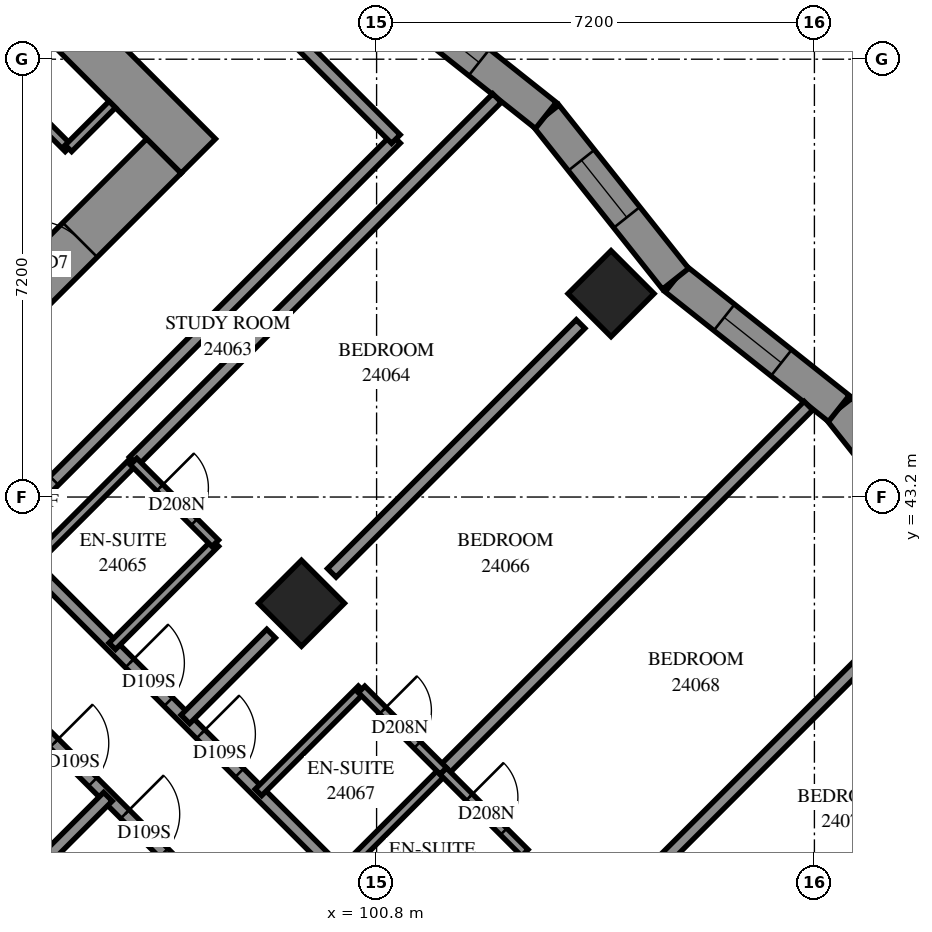
"""IFC4 building model, lengths in metres.
Left out: names, types, materials, properties, quantities, classifications, styles, units other than length and angle.
Written with IfcOpenShell. Run it as: python <this file> out.ifc"""

import sys

from ifc_helpers import new_model, si_unit, direction, frame, frame_2d, origin, origin_2d, place, context, subcontext, project, spatial, polyline, rectangle, outline, extrude, element, fill, save


model = new_model("IFC4")
c1 = context("Model", 3, precision=1e-05, world=origin(), true_north=direction((0.0, 1.0)))
c2 = subcontext(c1, "Body", "Model", "MODEL_VIEW")
j1 = project(units=[si_unit("LENGTHUNIT", "METRE"), si_unit("PLANEANGLEUNIT", "RADIAN")], contexts=[c1])
p1 = place(None, origin())
s1 = spatial("IfcSite", under=j1, at=p1, CompositionType="ELEMENT")
p2 = place(p1, origin())
s2 = spatial("IfcBuilding", under=s1, at=p2, CompositionType="ELEMENT")
p3 = place(p2, frame((0.0, 0.0, 91.4)))
s3 = spatial("IfcBuildingStorey", under=s2, at=p3, CompositionType="ELEMENT", Elevation=91.4)
for number, where, z_axis, x_axis in (
    (1, (104.656, 46.544, 0.0), (0.0, 0.0, 1.0), (0.707, -0.707, 0.0)),
    (2, (99.565, 41.453, 0.0), (0.0, 0.0, 1.0), (0.707, -0.707, 0.0)),
):
    element("IfcColumn", number, at=place(p3, frame(where, z_axis=z_axis, x_axis=x_axis)), inside=s3, PredefinedType="COLUMN", context=c2, shape_type="SweptSolid", body=[
        extrude(rectangle(XDim=1.0, YDim=1.0, at=origin_2d()), origin(), (0.0, 0.0, 1.0), 3.1),
    ])
p4 = place(p3, frame((86.554, 60.121, -0.3), z_axis=(0.0, 0.0, 1.0), x_axis=(0.7071067812, -0.7071067812, 0.0)))
e3 = element("IfcWall", 3, at=p4, inside=s3, PredefinedType="SHEAR", context=c2, shape_type="SweptSolid", body=[
    extrude(rectangle(XDim=16.0, YDim=0.8, at=frame_2d((8.0, 0.0))), origin(), (0.0, 0.0, 1.0), 2.7),
])
p5 = place(p4, frame((10.8, 0.0, 0.3)))
e4 = element("IfcOpeningElement", 4, at=p5, cuts=e3, PredefinedType="OPENING", context=c2, shape_type="SweptSolid", body=[
    extrude(rectangle(XDim=0.8, YDim=2.1, at=frame_2d((0.4, 1.05))), frame((0.0, 0.41, 0.0), z_axis=(0.0, -1.0, 0.0), x_axis=(1.0, 0.0, 0.0)), (0.0, 0.0, 1.0), 0.82),
])
p6 = place(p3, frame((87.12, 38.625, -0.3), z_axis=(0.0, 0.0, 1.0), x_axis=(0.7071067812, 0.7071067812, 0.0)))
e5 = element("IfcWall", 5, at=p6, inside=s3, PredefinedType="SHEAR", context=c2, shape_type="SweptSolid", body=[
    extrude(rectangle(XDim=14.4, YDim=0.8, at=frame_2d((7.2, 0.0))), origin(), (0.0, 0.0, 1.0), 2.7),
])
p7 = place(p6, frame((4.55, 0.0, 0.3)))
e6 = element("IfcOpeningElement", 6, at=p7, cuts=e5, PredefinedType="OPENING", context=c2, shape_type="SweptSolid", body=[
    extrude(rectangle(XDim=1.1, YDim=2.1, at=frame_2d((0.55, 1.05))), frame((0.0, 0.41, 0.0), z_axis=(0.0, -1.0, 0.0), x_axis=(1.0, 0.0, 0.0)), (0.0, 0.0, 1.0), 0.82),
])
p8 = place(p6, frame((11.35, 0.0, 0.3)))
e7 = element("IfcOpeningElement", 7, at=p8, cuts=e5, PredefinedType="OPENING", context=c2, shape_type="SweptSolid", body=[
    extrude(rectangle(XDim=1.1, YDim=2.1, at=frame_2d((0.55, 1.05))), frame((0.0, 0.41, 0.0), z_axis=(0.0, -1.0, 0.0), x_axis=(1.0, 0.0, 0.0)), (0.0, 0.0, 1.0), 0.82),
])
p9 = place(p3, frame((110.551, 41.951, 0.0), z_axis=(0.0, 0.0, 1.0), x_axis=(-0.6218910216, 0.7831037972, 0.0)))
e8 = element("IfcWall", 8, at=p9, inside=s3, PredefinedType="SOLIDWALL", context=c2, shape_type="SweptSolid", body=[
    extrude(outline(polyline([(0.055, -0.275), (3.485, -0.275), (3.422, 0.275), (-0.055, 0.275), (0.055, -0.275)])), origin(), (0.0, 0.0, 1.0), 3.1),
])
p10 = place(p9, frame((1.111, 0.0, 0.5)))
e9 = element("IfcOpeningElement", 9, at=p10, cuts=e8, PredefinedType="OPENING", context=c2, shape_type="SweptSolid", body=[
    extrude(rectangle(XDim=1.2, YDim=2.45, at=frame_2d((0.6, 1.225))), frame((0.0, 0.285, 0.0), z_axis=(0.0, -1.0, 0.0), x_axis=(1.0, 0.0, 0.0)), (0.0, 0.0, 1.0), 0.57),
])
p11 = place(p3, frame((108.403, 44.656, 0.0), z_axis=(0.0, 0.0, 1.0), x_axis=(-0.7830937263, 0.6219037031, 0.0)))
e10 = element("IfcWall", 10, at=p11, inside=s3, PredefinedType="SOLIDWALL", context=c2, shape_type="SweptSolid", body=[
    extrude(outline(polyline([(-0.032, -0.275), (3.398, -0.275), (3.462, 0.275), (0.032, 0.275), (-0.032, -0.275)])), origin(), (0.0, 0.0, 1.0), 3.1),
])
p12 = place(p11, frame((1.209, 0.0, 0.5)))
e11 = element("IfcOpeningElement", 11, at=p12, cuts=e10, PredefinedType="OPENING", context=c2, shape_type="SweptSolid", body=[
    extrude(rectangle(XDim=1.2, YDim=2.45, at=frame_2d((0.6, 1.225))), frame((0.0, 0.285, 0.0), z_axis=(0.0, -1.0, 0.0), x_axis=(1.0, 0.0, 0.0)), (0.0, 0.0, 1.0), 0.57),
])
p13 = place(p3, frame((105.717, 46.789, 0.0), z_axis=(0.0, 0.0, 1.0), x_axis=(-0.621900023, 0.7830966489, 0.0)))
e12 = element("IfcWall", 12, at=p13, inside=s3, PredefinedType="SOLIDWALL", context=c2, shape_type="SweptSolid", body=[
    extrude(outline(polyline([(0.032, -0.275), (3.462, -0.275), (3.398, 0.275), (-0.032, 0.275), (0.032, -0.275)])), origin(), (0.0, 0.0, 1.0), 3.1),
])
p14 = place(p13, frame((1.29, 0.0, 0.5)))
e13 = element("IfcOpeningElement", 13, at=p14, cuts=e12, PredefinedType="OPENING", context=c2, shape_type="SweptSolid", body=[
    extrude(rectangle(XDim=1.2, YDim=2.45, at=frame_2d((0.6, 1.225))), frame((0.0, 0.285, 0.0), z_axis=(0.0, -1.0, 0.0), x_axis=(1.0, 0.0, 0.0)), (0.0, 0.0, 1.0), 0.57),
])
p15 = place(p3, frame((103.584, 49.475, 0.0), z_axis=(0.0, 0.0, 1.0), x_axis=(-0.7830937263, 0.6219037031, 0.0)))
e14 = element("IfcWall", 14, at=p15, inside=s3, PredefinedType="SOLIDWALL", context=c2, shape_type="SweptSolid", body=[
    extrude(outline(polyline([(-0.032, -0.275), (3.398, -0.275), (3.462, 0.275), (0.032, 0.275), (-0.032, -0.275)])), origin(), (0.0, 0.0, 1.0), 3.1),
])
p16 = place(p15, frame((1.402, 0.0, 0.5)))
e15 = element("IfcOpeningElement", 15, at=p16, cuts=e14, PredefinedType="OPENING", context=c2, shape_type="SweptSolid", body=[
    extrude(rectangle(XDim=1.2, YDim=2.45, at=frame_2d((0.6, 1.225))), frame((0.0, 0.285, 0.0), z_axis=(0.0, -1.0, 0.0), x_axis=(1.0, 0.0, 0.0)), (0.0, 0.0, 1.0), 0.57),
])
p17 = place(p3, frame((91.313, 53.354, 0.0), z_axis=(0.0, 0.0, 1.0), x_axis=(0.7071147811, -0.7070987812, 0.0)))
e16 = element("IfcWall", 16, at=p17, inside=s3, PredefinedType="PARTITIONING", context=c2, shape_type="SweptSolid", body=[
    extrude(rectangle(XDim=6.25, YDim=0.15, at=frame_2d((3.125, 0.0))), origin(), (0.0, 0.0, 1.0), 3.1),
])
p18 = place(p3, frame((95.732, 48.934, 0.0), z_axis=(0.0, 0.0, 1.0), x_axis=(0.7071067812, 0.7071067812, 0.0)))
e17 = element("IfcWall", 17, at=p18, inside=s3, PredefinedType="PARTITIONING", context=c2, shape_type="SweptSolid", body=[
    extrude(rectangle(XDim=1.02, YDim=0.15, at=frame_2d((0.51, 0.0))), origin(), (0.0, 0.0, 1.0), 3.1),
])
p19 = place(p3, frame((93.339, 41.309, 0.0), z_axis=(0.0, 0.0, 1.0), x_axis=(0.7071067812, -0.7071067812, 0.0)))
e18 = element("IfcWall", 18, at=p19, inside=s3, PredefinedType="PARTITIONING", context=c2, shape_type="SweptSolid", body=[
    extrude(rectangle(XDim=18.702, YDim=0.2, at=frame_2d((9.351, 0.0))), origin(), (0.0, 0.0, 1.0), 3.1),
])
p20 = place(p19, frame((3.05, 0.0, 0.0)))
e19 = element("IfcOpeningElement", 19, at=p20, cuts=e18, PredefinedType="OPENING", context=c2, shape_type="SweptSolid", body=[
    extrude(rectangle(XDim=0.9, YDim=2.1, at=frame_2d((0.45, 1.05))), frame((0.0, 0.11, 0.0), z_axis=(0.0, -1.0, 0.0), x_axis=(1.0, 0.0, 0.0)), (0.0, 0.0, 1.0), 0.22),
])
p21 = place(p19, frame((4.7, 0.0, 0.0)))
e20 = element("IfcOpeningElement", 20, at=p21, cuts=e18, PredefinedType="OPENING", context=c2, shape_type="SweptSolid", body=[
    extrude(rectangle(XDim=0.9, YDim=2.1, at=frame_2d((0.45, 1.05))), frame((0.0, 0.11, 0.0), z_axis=(0.0, -1.0, 0.0), x_axis=(1.0, 0.0, 0.0)), (0.0, 0.0, 1.0), 0.22),
])
p22 = place(p19, frame((10.149, 0.0, 0.0)))
e21 = element("IfcOpeningElement", 21, at=p22, cuts=e18, PredefinedType="OPENING", context=c2, shape_type="SweptSolid", body=[
    extrude(rectangle(XDim=0.9, YDim=2.1, at=frame_2d((0.45, 1.05))), frame((0.0, 0.11, 0.0), z_axis=(0.0, -1.0, 0.0), x_axis=(1.0, 0.0, 0.0)), (0.0, 0.0, 1.0), 0.22),
])
p23 = place(p19, frame((11.9, 0.0, 0.0)))
e22 = element("IfcOpeningElement", 22, at=p23, cuts=e18, PredefinedType="OPENING", context=c2, shape_type="SweptSolid", body=[
    extrude(rectangle(XDim=0.9, YDim=2.1, at=frame_2d((0.45, 1.05))), frame((0.0, 0.11, 0.0), z_axis=(0.0, -1.0, 0.0), x_axis=(1.0, 0.0, 0.0)), (0.0, 0.0, 1.0), 0.22),
])
p24 = place(p19, frame((17.45, 0.0, 0.0)))
e23 = element("IfcOpeningElement", 23, at=p24, cuts=e18, PredefinedType="OPENING", context=c2, shape_type="SweptSolid", body=[
    extrude(rectangle(XDim=0.9, YDim=2.1, at=frame_2d((0.45, 1.05))), frame((0.0, 0.11, 0.0), z_axis=(0.0, -1.0, 0.0), x_axis=(1.0, 0.0, 0.0)), (0.0, 0.0, 1.0), 0.22),
])
p25 = place(p3, frame((94.615, 42.587, 0.0), z_axis=(0.0, 0.0, 1.0), x_axis=(0.7071067812, 0.7071067812, 0.0)))
e24 = element("IfcWall", 24, at=p25, inside=s3, PredefinedType="PARTITIONING", context=c2, shape_type="SweptSolid", body=[
    extrude(rectangle(XDim=9.198, YDim=0.2, at=frame_2d((4.599, 0.0))), origin(), (0.0, 0.0, 1.0), 3.1),
])
p26 = place(p25, frame((0.248, 0.0, 0.0)))
e25 = element("IfcOpeningElement", 25, at=p26, cuts=e24, PredefinedType="OPENING", context=c2, shape_type="SweptSolid", body=[
    extrude(rectangle(XDim=1.0, YDim=2.1, at=frame_2d((0.5, 1.05))), frame((0.0, 0.11, 0.0), z_axis=(0.0, -1.0, 0.0), x_axis=(1.0, 0.0, 0.0)), (0.0, 0.0, 1.0), 0.22),
])
p27 = place(p3, frame((101.896, 38.698, 0.0), z_axis=(0.0, 0.0, 1.0), x_axis=(0.7072304079, 0.7069831328, 0.0)))
e26 = element("IfcWall", 26, at=p27, inside=s3, PredefinedType="PARTITIONING", context=c2, shape_type="SweptSolid", body=[
    extrude(rectangle(XDim=8.493, YDim=0.2, at=frame_2d((4.246, 0.0))), origin(), (0.0, 0.0, 1.0), 3.1),
])
p28 = place(p3, frame((96.805, 43.787, 0.0), z_axis=(0.0, 0.0, 1.0), x_axis=(0.7071126983, 0.707100864, 0.0)))
e27 = element("IfcWall", 27, at=p28, inside=s3, PredefinedType="PARTITIONING", context=c2, shape_type="SweptSolid", body=[
    extrude(rectangle(XDim=8.45, YDim=0.2, at=frame_2d((4.225, 0.0))), origin(), (0.0, 0.0, 1.0), 3.1),
])
p29 = place(p3, frame((94.62, 42.587, 0.0), z_axis=(0.0, 0.0, 1.0), x_axis=(0.7071067812, -0.7071067812, 0.0)))
e28 = element("IfcWall", 28, at=p29, inside=s3, PredefinedType="PARTITIONING", context=c2, shape_type="SweptSolid", body=[
    extrude(rectangle(XDim=7.9, YDim=0.2, at=frame_2d((3.95, 0.0))), origin(), (0.0, 0.0, 1.0), 3.1),
])
p30 = place(p29, frame((2.998, 0.0, 0.0)))
e29 = element("IfcOpeningElement", 29, at=p30, cuts=e28, PredefinedType="OPENING", context=c2, shape_type="SweptSolid", body=[
    extrude(rectangle(XDim=0.9, YDim=2.1, at=frame_2d((0.45, 1.05))), frame((0.0, 0.11, 0.0), z_axis=(0.0, -1.0, 0.0), x_axis=(1.0, 0.0, 0.0)), (0.0, 0.0, 1.0), 0.22),
])
p31 = place(p29, frame((4.649, 0.0, 0.0)))
e30 = element("IfcOpeningElement", 30, at=p31, cuts=e28, PredefinedType="OPENING", context=c2, shape_type="SweptSolid", body=[
    extrude(rectangle(XDim=0.9, YDim=2.1, at=frame_2d((0.45, 1.05))), frame((0.0, 0.11, 0.0), z_axis=(0.0, -1.0, 0.0), x_axis=(1.0, 0.0, 0.0)), (0.0, 0.0, 1.0), 0.22),
])
for number, where, z_axis, x_axis in (
    (31, (105.155, 36.863, 0.0), (0.0, 0.0, 1.0), (0.707, 0.707, 0.0)),
    (32, (100.063, 41.953, 0.0), (0.0, 0.0, 1.0), (0.707, 0.707, 0.0)),
):
    element("IfcWall", number, at=place(p3, frame(where, z_axis=z_axis, x_axis=x_axis)), inside=s3, PredefinedType="PARTITIONING", context=c2, shape_type="SweptSolid", body=[
        extrude(rectangle(XDim=5.787, YDim=0.2, at=frame_2d((2.893, 0.0))), origin(), (0.0, 0.0, 1.0), 3.1),
    ])
p32 = place(p3, frame((99.071, 51.133, 0.0), z_axis=(0.0, 0.0, 1.0), x_axis=(0.7071067812, -0.7071067812, 0.0)))
e33 = element("IfcWall", 33, at=p32, inside=s3, PredefinedType="PARTITIONING", context=c2, shape_type="SweptSolid", body=[
    extrude(rectangle(XDim=2.893, YDim=0.2, at=frame_2d((1.447, 0.0))), origin(), (0.0, 0.0, 1.0), 3.1),
])
p33 = place(p3, frame((100.203, 36.997, 0.0), z_axis=(0.0, 0.0, 1.0), x_axis=(0.706689978, 0.7075233388, 0.0)))
e34 = element("IfcWall", 34, at=p33, inside=s3, PredefinedType="PARTITIONING", context=c2, shape_type="SweptSolid", body=[
    extrude(rectangle(XDim=2.4, YDim=0.15, at=frame_2d((1.2, 0.0))), origin(), (0.0, 0.0, 1.0), 3.1),
])
for number, where, z_axis, x_axis in (
    (35, (96.453, 40.747, 0.0), (0.0, 0.0, 1.0), (0.707, 0.707, 0.0)),
    (36, (95.109, 42.091, 0.0), (0.0, 0.0, 1.0), (0.707, 0.707, 0.0)),
    (37, (98.857, 38.343, 0.0), (0.0, 0.0, 1.0), (0.707, 0.707, 0.0)),
    (38, (101.545, 35.657, 0.0), (0.0, 0.0, 1.0), (0.707, 0.707, 0.0)),
):
    element("IfcWall", number, at=place(p3, frame(where, z_axis=z_axis, x_axis=x_axis)), inside=s3, PredefinedType="PARTITIONING", context=c2, shape_type="SweptSolid", body=[
        extrude(rectangle(XDim=2.398, YDim=0.15, at=frame_2d((1.199, 0.0))), origin(), (0.0, 0.0, 1.0), 3.1),
    ])
for number, where, z_axis, x_axis in (
    (39, (97.655, 39.545, 0.0), (0.0, 0.0, 1.0), (0.707, 0.707, 0.0)),
    (40, (94.972, 36.862, 0.0), (0.0, 0.0, 1.0), (0.707, 0.707, 0.0)),
):
    element("IfcWall", number, at=place(p3, frame(where, z_axis=z_axis, x_axis=x_axis)), inside=s3, PredefinedType="PARTITIONING", context=c2, shape_type="SweptSolid", body=[
        extrude(rectangle(XDim=1.994, YDim=0.2, at=frame_2d((0.997, 0.0))), origin(), (0.0, 0.0, 1.0), 3.1),
    ])
p34 = place(p3, frame((96.803, 43.783, 0.0), z_axis=(0.0, 0.0, 1.0), x_axis=(0.7071067812, -0.7071067812, 0.0)))
e41 = element("IfcWall", 41, at=p34, inside=s3, PredefinedType="PARTITIONING", context=c2, shape_type="SweptSolid", body=[
    extrude(rectangle(XDim=1.901, YDim=0.15, at=frame_2d((0.95, 0.0))), origin(), (0.0, 0.0, 1.0), 3.1),
])
p35 = place(p34, frame((0.609, 0.0, 0.0)))
e42 = element("IfcOpeningElement", 42, at=p35, cuts=e41, PredefinedType="OPENING", context=c2, shape_type="SweptSolid", body=[
    extrude(rectangle(XDim=0.8, YDim=2.1, at=frame_2d((0.4, 1.05))), frame((0.0, 0.085, 0.0), z_axis=(0.0, -1.0, 0.0), x_axis=(1.0, 0.0, 0.0)), (0.0, 0.0, 1.0), 0.17),
])
p36 = place(p3, frame((101.894, 38.693, 0.0), z_axis=(0.0, 0.0, 1.0), x_axis=(0.7071067812, -0.7071067812, 0.0)))
e43 = element("IfcWall", 43, at=p36, inside=s3, PredefinedType="PARTITIONING", context=c2, shape_type="SweptSolid", body=[
    extrude(rectangle(XDim=1.901, YDim=0.15, at=frame_2d((0.95, 0.0))), origin(), (0.0, 0.0, 1.0), 3.1),
])
p37 = place(p36, frame((0.608, 0.0, 0.0)))
e44 = element("IfcOpeningElement", 44, at=p37, cuts=e43, PredefinedType="OPENING", context=c2, shape_type="SweptSolid", body=[
    extrude(rectangle(XDim=0.8, YDim=2.1, at=frame_2d((0.4, 1.05))), frame((0.0, 0.085, 0.0), z_axis=(0.0, -1.0, 0.0), x_axis=(1.0, 0.0, 0.0)), (0.0, 0.0, 1.0), 0.17),
])
p38 = place(p3, frame((100.553, 40.037, 0.0), z_axis=(0.0, 0.0, 1.0), x_axis=(0.7076330979, -0.7065800724, 0.0)))
e45 = element("IfcWall", 45, at=p38, inside=s3, PredefinedType="PARTITIONING", context=c2, shape_type="SweptSolid", body=[
    extrude(rectangle(XDim=1.899, YDim=0.15, at=frame_2d((0.95, 0.0))), origin(), (0.0, 0.0, 1.0), 3.1),
])
p39 = place(p38, frame((0.493, 0.0, 0.0)))
e46 = element("IfcOpeningElement", 46, at=p39, cuts=e45, PredefinedType="OPENING", context=c2, shape_type="SweptSolid", body=[
    extrude(rectangle(XDim=0.8, YDim=2.1, at=frame_2d((0.4, 1.05))), frame((0.0, 0.085, 0.0), z_axis=(0.0, -1.0, 0.0), x_axis=(1.0, 0.0, 0.0)), (0.0, 0.0, 1.0), 0.17),
])
p40 = place(p12, origin())
e47 = element("IfcWindow", 47, at=p40, inside=s3, PartitioningType="SINGLE_PANEL", PredefinedType="WINDOW", context=c2, shape_type="SweptSolid", body=[
    extrude(rectangle(XDim=1.2, YDim=2.45, at=frame_2d((0.6, 1.225))), frame((0.0, 0.155, 0.0), z_axis=(0.0, -1.0, 0.0), x_axis=(1.0, 0.0, 0.0)), (0.0, 0.0, 1.0), 0.06),
])
fill(e11, e47)
p41 = place(p14, origin())
e48 = element("IfcWindow", 48, at=p41, inside=s3, PartitioningType="SINGLE_PANEL", PredefinedType="WINDOW", context=c2, shape_type="SweptSolid", body=[
    extrude(rectangle(XDim=1.2, YDim=2.45, at=frame_2d((0.6, 1.225))), frame((0.0, 0.155, 0.0), z_axis=(0.0, -1.0, 0.0), x_axis=(1.0, 0.0, 0.0)), (0.0, 0.0, 1.0), 0.06),
])
fill(e13, e48)
p42 = place(p16, origin())
e49 = element("IfcWindow", 49, at=p42, inside=s3, PartitioningType="SINGLE_PANEL", PredefinedType="WINDOW", context=c2, shape_type="SweptSolid", body=[
    extrude(rectangle(XDim=1.2, YDim=2.45, at=frame_2d((0.6, 1.225))), frame((0.0, 0.155, 0.0), z_axis=(0.0, -1.0, 0.0), x_axis=(1.0, 0.0, 0.0)), (0.0, 0.0, 1.0), 0.06),
])
fill(e15, e49)
p43 = place(p8, origin())
e50 = element("IfcDoor", 50, at=p43, inside=s3, OperationType="SINGLE_SWING_RIGHT", PredefinedType="DOOR", context=c2, shape_type="SweptSolid", body=[
    extrude(rectangle(XDim=1.1, YDim=2.1, at=frame_2d((0.55, 1.05))), frame((0.0, 0.025, 0.0), z_axis=(0.0, -1.0, 0.0), x_axis=(1.0, 0.0, 0.0)), (0.0, 0.0, 1.0), 0.05),
])
fill(e7, e50)
p44 = place(p26, origin())
e51 = element("IfcDoor", 51, at=p44, inside=s3, OperationType="SINGLE_SWING_RIGHT", PredefinedType="DOOR", context=c2, shape_type="SweptSolid", body=[
    extrude(rectangle(XDim=1.0, YDim=2.1, at=frame_2d((0.5, 1.05))), frame((0.0, 0.025, 0.0), z_axis=(0.0, -1.0, 0.0), x_axis=(1.0, 0.0, 0.0)), (0.0, 0.0, 1.0), 0.05),
])
fill(e25, e51)
p45 = place(p30, origin())
e52 = element("IfcDoor", 52, at=p45, inside=s3, OperationType="SINGLE_SWING_RIGHT", PredefinedType="DOOR", context=c2, shape_type="SweptSolid", body=[
    extrude(rectangle(XDim=0.9, YDim=2.1, at=frame_2d((0.45, 1.05))), frame((0.0, 0.025, 0.0), z_axis=(0.0, -1.0, 0.0), x_axis=(1.0, 0.0, 0.0)), (0.0, 0.0, 1.0), 0.05),
])
fill(e29, e52)
p46 = place(p35, origin())
e53 = element("IfcDoor", 53, at=p46, inside=s3, OperationType="SINGLE_SWING_RIGHT", PredefinedType="DOOR", context=c2, shape_type="SweptSolid", body=[
    extrude(rectangle(XDim=0.8, YDim=2.1, at=frame_2d((0.4, 1.05))), frame((0.0, 0.025, 0.0), z_axis=(0.0, -1.0, 0.0), x_axis=(1.0, 0.0, 0.0)), (0.0, 0.0, 1.0), 0.05),
])
fill(e42, e53)
p47 = place(p31, origin())
e54 = element("IfcDoor", 54, at=p47, inside=s3, OperationType="SINGLE_SWING_LEFT", PredefinedType="DOOR", context=c2, shape_type="SweptSolid", body=[
    extrude(rectangle(XDim=0.9, YDim=2.1, at=frame_2d((0.45, 1.05))), frame((0.0, 0.025, 0.0), z_axis=(0.0, -1.0, 0.0), x_axis=(1.0, 0.0, 0.0)), (0.0, 0.0, 1.0), 0.05),
])
fill(e30, e54)
p48 = place(p39, origin())
e55 = element("IfcDoor", 55, at=p48, inside=s3, OperationType="SINGLE_SWING_RIGHT", PredefinedType="DOOR", context=c2, shape_type="SweptSolid", body=[
    extrude(rectangle(XDim=0.8, YDim=2.1, at=frame_2d((0.4, 1.05))), frame((0.0, 0.025, 0.0), z_axis=(0.0, -1.0, 0.0), x_axis=(1.0, 0.0, 0.0)), (0.0, 0.0, 1.0), 0.05),
])
fill(e46, e55)
p49 = place(p37, origin())
e56 = element("IfcDoor", 56, at=p49, inside=s3, OperationType="SINGLE_SWING_RIGHT", PredefinedType="DOOR", context=c2, shape_type="SweptSolid", body=[
    extrude(rectangle(XDim=0.8, YDim=2.1, at=frame_2d((0.4, 1.05))), frame((0.0, 0.025, 0.0), z_axis=(0.0, -1.0, 0.0), x_axis=(1.0, 0.0, 0.0)), (0.0, 0.0, 1.0), 0.05),
])
fill(e44, e56)
p50 = place(p20, origin())
e57 = element("IfcDoor", 57, at=p50, inside=s3, OperationType="SINGLE_SWING_LEFT", PredefinedType="DOOR", context=c2, shape_type="SweptSolid", body=[
    extrude(rectangle(XDim=0.9, YDim=2.1, at=frame_2d((0.45, 1.05))), frame((0.0, 0.025, 0.0), z_axis=(0.0, -1.0, 0.0), x_axis=(1.0, 0.0, 0.0)), (0.0, 0.0, 1.0), 0.05),
])
fill(e19, e57)
p51 = place(p21, origin())
e58 = element("IfcDoor", 58, at=p51, inside=s3, OperationType="SINGLE_SWING_RIGHT", PredefinedType="DOOR", context=c2, shape_type="SweptSolid", body=[
    extrude(rectangle(XDim=0.9, YDim=2.1, at=frame_2d((0.45, 1.05))), frame((0.0, 0.025, 0.0), z_axis=(0.0, -1.0, 0.0), x_axis=(1.0, 0.0, 0.0)), (0.0, 0.0, 1.0), 0.05),
])
fill(e20, e58)
save(model, sys.argv[1])
